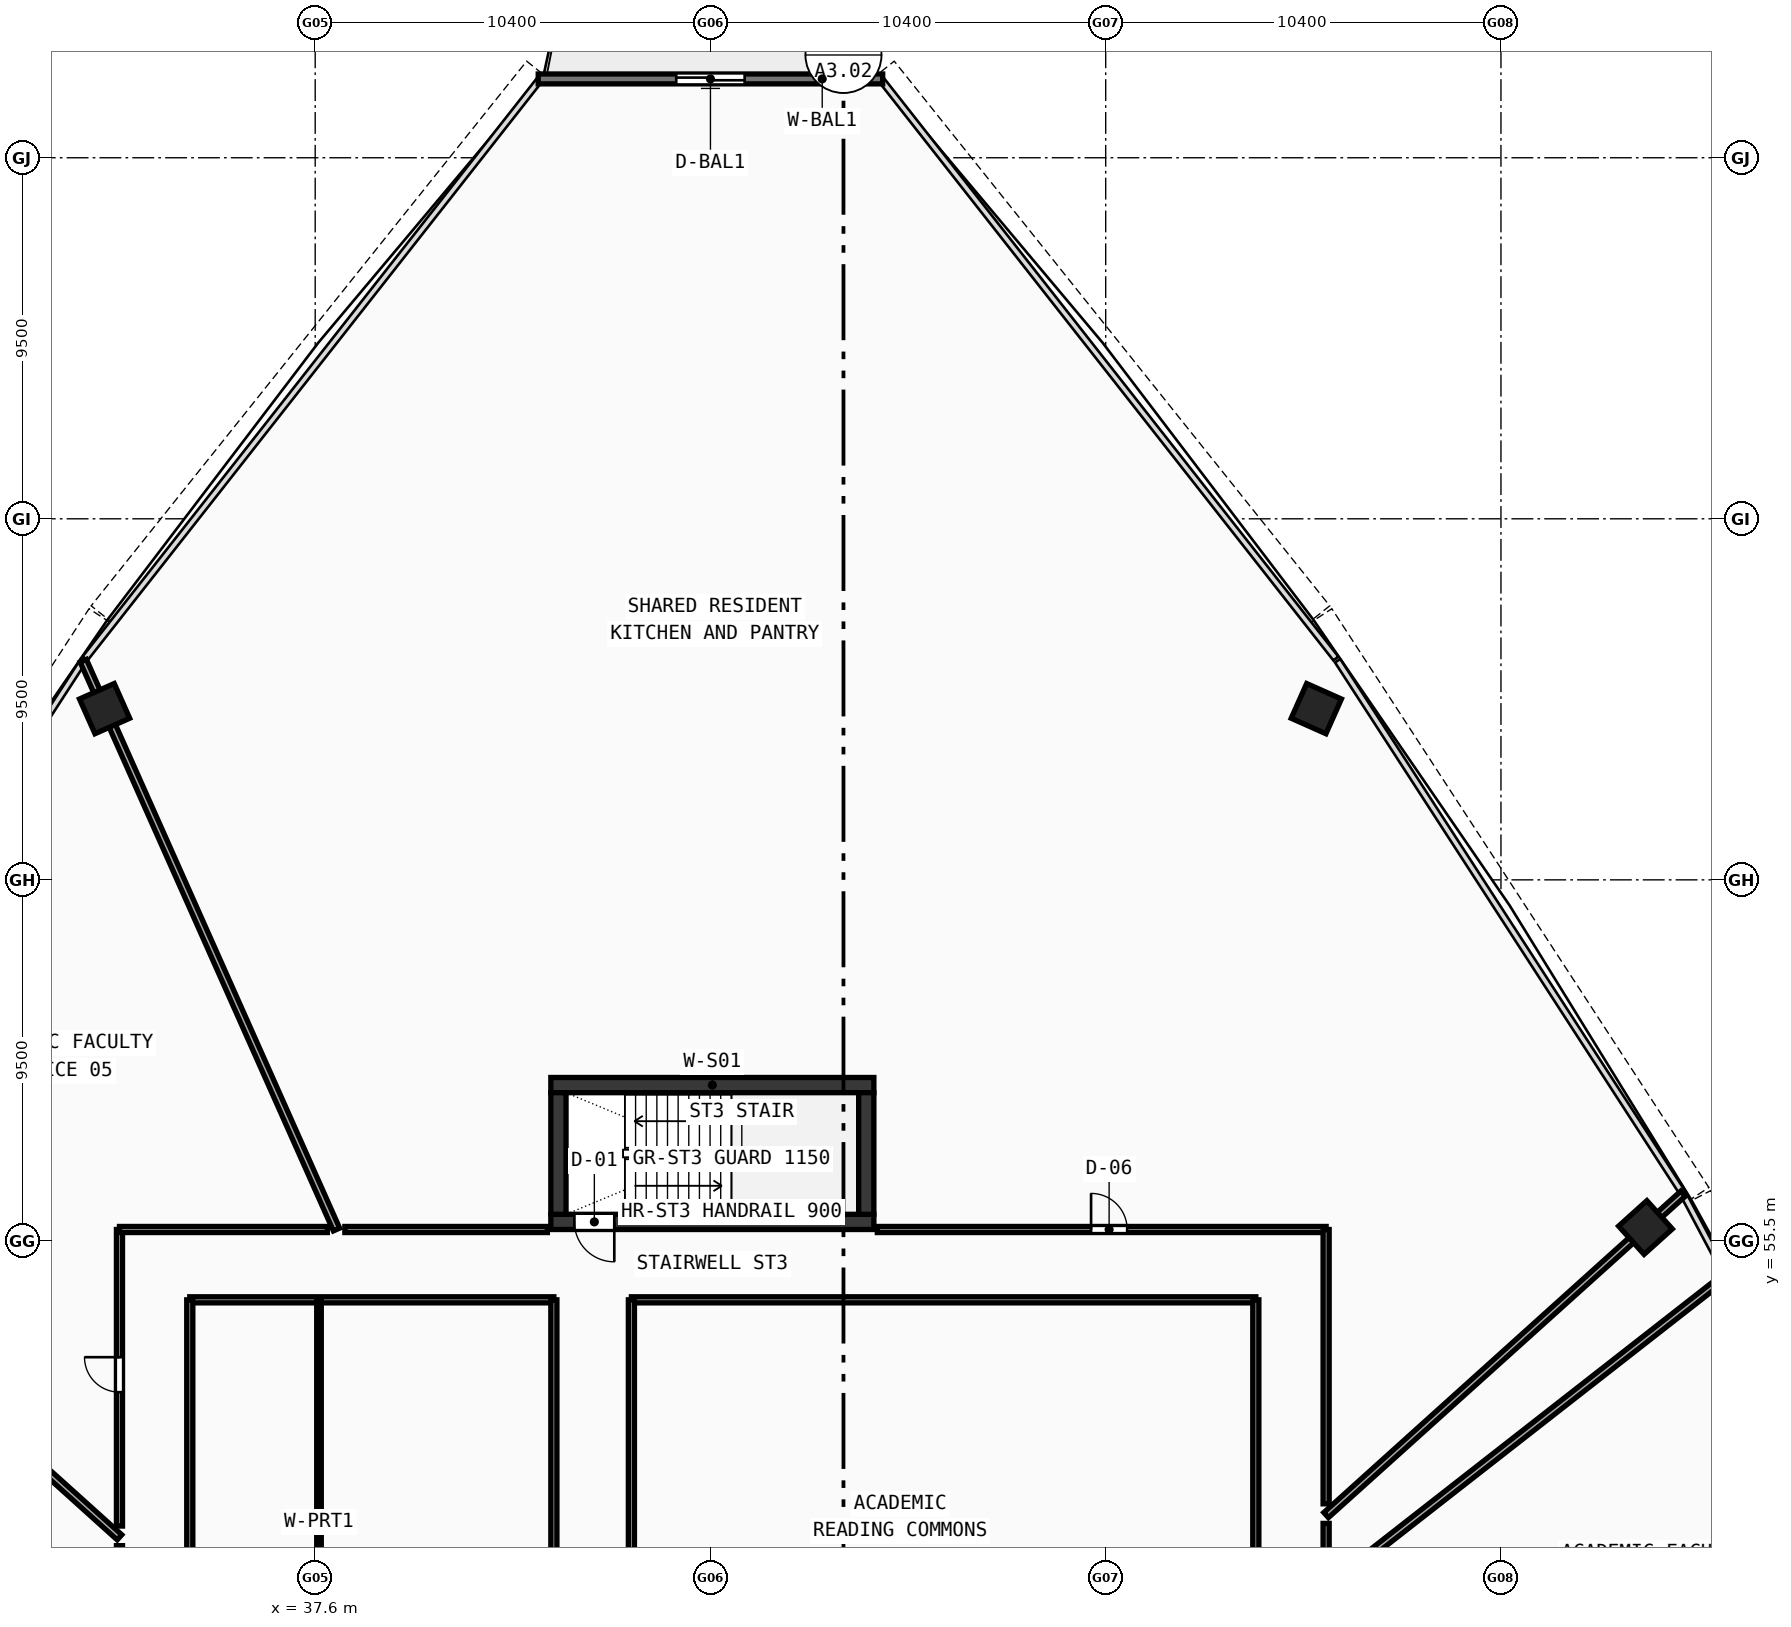
"""IFC4 building model, lengths in metres.
Left out: names, types, materials, properties, quantities, classifications, styles, units other than length and angle.
Written with IfcOpenShell. Run it as: python <this file> out.ifc"""

import sys

from ifc_helpers import new_model, si_unit, direction, frame, frame_2d, origin, origin_with_axes, origin_2d, place, context, subcontext, project, spatial, rectangle, hollow_rectangle, extrude, source, transform, mapped, element, fill, save


model = new_model("IFC4")
c1 = context("Model", 3, precision=1e-05, world=origin(), true_north=direction((0.0, 1.0)))
c2 = subcontext(c1, "Body", "Model", "MODEL_VIEW")
j1 = project(units=[si_unit("LENGTHUNIT", "METRE"), si_unit("PLANEANGLEUNIT", "RADIAN")], contexts=[c1])
p1 = place(None, origin())
s1 = spatial("IfcSite", under=j1, at=p1, CompositionType="ELEMENT")
p2 = place(p1, origin())
s2 = spatial("IfcBuilding", under=s1, at=p2, CompositionType="ELEMENT")
p3 = place(p2, frame((0.0, 0.0, 111.58)))
s3 = spatial("IfcBuildingStorey", under=s2, at=p3, CompositionType="ELEMENT", Elevation=111.58)
p4 = place(p3, frame((43.8, 59.6, 0.0), z_axis=(0.0, 0.0, 1.0), x_axis=(1.0, 0.0, 0.0)))
e1 = element("IfcWall", 1, at=p4, inside=s3, PredefinedType="SHEAR", context=c2, shape_type="SweptSolid", body=[
    extrude(rectangle(XDim=8.5, YDim=0.4, at=frame_2d((4.25, 0.0))), origin(), (0.0, 0.0, 1.0), 3.54),
])
p5 = place(p3, frame((43.8, 56.0, 0.0), z_axis=(0.0, 0.0, 1.0), x_axis=(1.0, 0.0, 0.0)))
e2 = element("IfcWall", 2, at=p5, inside=s3, PredefinedType="SHEAR", context=c2, shape_type="SweptSolid", body=[
    extrude(rectangle(XDim=8.5, YDim=0.4, at=frame_2d((4.25, 0.0))), origin(), (0.0, 0.0, 1.0), 3.54),
])
p6 = place(p5, frame((0.62, 0.0, 0.0)))
e3 = element("IfcOpeningElement", 3, at=p6, cuts=e2, PredefinedType="OPENING", context=c2, shape_type="SweptSolid", body=[
    extrude(rectangle(XDim=1.05, YDim=2.1, at=frame_2d((0.525, 1.05))), frame((0.0, 0.21, 0.0), z_axis=(0.0, -1.0, 0.0), x_axis=(1.0, 0.0, 0.0)), (0.0, 0.0, 1.0), 0.42),
])
for number, where, z_axis, x_axis in (
    (4, (44.0, 56.2, 0.0), (0.0, 0.0, 1.0), (0.0, 1.0, 0.0)),
    (5, (52.1, 56.2, 0.0), (0.0, 0.0, 1.0), (0.0, 1.0, 0.0)),
):
    element("IfcWall", number, at=place(p3, frame(where, z_axis=z_axis, x_axis=x_axis)), inside=s3, PredefinedType="SHEAR", context=c2, shape_type="SweptSolid", body=[
        extrude(rectangle(XDim=3.2, YDim=0.4, at=frame_2d((1.6, 0.0))), origin(), (0.0, 0.0, 1.0), 3.54),
    ])
m1 = source(origin(), c2, "Body", "SweptSolid", [
    extrude(hollow_rectangle(XDim=1.0, YDim=1.0, WallThickness=0.042, at=origin_2d()), origin(), (0.0, 0.0, 1.0), 3.8),
])
for number, where, z_axis, x_axis in (
    (6, (72.603, 55.852, -0.26), (0.0, 0.0, 1.0), (-0.669, 0.743, 0.0)),
    (7, (63.941, 69.505, -0.26), (0.0, 0.0, 1.0), (-0.914, 0.407, 0.0)),
    (8, (32.059, 69.505, -0.26), (0.0, 0.0, 1.0), (-0.914, -0.407, 0.0)),
):
    element("IfcColumn", number, at=place(p3, frame(where, z_axis=z_axis, x_axis=x_axis)), inside=s3, PredefinedType="COLUMN", context=c2, shape_type="MappedRepresentation", body=[
        mapped(m1, transform((0.0, 0.0, 0.0), scale=1.0)),
    ])
p7 = place(p3, frame((52.532, 86.074, 0.0), z_axis=(0.0, 0.0, 1.0), x_axis=(-1.0, 0.0, 0.0)))
e9 = element("IfcWall", 9, at=p7, inside=s3, PredefinedType="STANDARD", context=c2, shape_type="SweptSolid", body=[
    extrude(rectangle(XDim=9.063, YDim=0.26, at=frame_2d((4.532, 0.0))), origin(), (0.0, 0.0, 1.0), 3.54),
])
p8 = place(p7, frame((3.632, 0.0, 0.0)))
e10 = element("IfcOpeningElement", 10, at=p8, cuts=e9, PredefinedType="OPENING", context=c2, shape_type="SweptSolid", body=[
    extrude(rectangle(XDim=1.8, YDim=2.15, at=frame_2d((0.9, 1.075))), frame((0.0, 0.14, 0.0), z_axis=(0.0, -1.0, 0.0), x_axis=(1.0, 0.0, 0.0)), (0.0, 0.0, 1.0), 0.28),
])
p9 = place(p3, frame((34.3, 53.95, 0.0), z_axis=(0.0, 0.0, 1.0), x_axis=(1.0, 0.0, 0.0)))
e11 = element("IfcWall", 11, at=p9, inside=s3, PredefinedType="PARTITIONING", context=c2, shape_type="SweptSolid", body=[
    extrude(rectangle(XDim=9.58, YDim=0.16, at=frame_2d((4.79, 0.0))), origin(), (0.0, 0.0, 1.0), 2.84),
])
for number, where, z_axis, x_axis in (
    (12, (34.3, 42.25, 0.0), (0.0, 0.0, 1.0), (0.0, 1.0, 0.0)),
    (13, (43.88, 42.25, 0.0), (0.0, 0.0, 1.0), (0.0, 1.0, 0.0)),
):
    element("IfcWall", number, at=place(p3, frame(where, z_axis=z_axis, x_axis=x_axis)), inside=s3, PredefinedType="PARTITIONING", context=c2, shape_type="SweptSolid", body=[
        extrude(rectangle(XDim=11.7, YDim=0.16, at=frame_2d((5.85, 0.0))), origin(), (0.0, 0.0, 1.0), 2.84),
    ])
p10 = place(p3, frame((37.7, 42.25, 0.0), z_axis=(0.0, 0.0, 1.0), x_axis=(0.0, 1.0, 0.0)))
e14 = element("IfcWall", 14, at=p10, inside=s3, PredefinedType="PARTITIONING", context=c2, shape_type="SweptSolid", body=[
    extrude(rectangle(XDim=11.7, YDim=0.12, at=frame_2d((5.85, 0.0))), origin(), (0.0, 0.0, 1.0), 2.84),
])
p11 = place(p3, frame((45.92, 53.95, 0.0), z_axis=(0.0, 0.0, 1.0), x_axis=(1.0, 0.0, 0.0)))
e15 = element("IfcWall", 15, at=p11, inside=s3, PredefinedType="PARTITIONING", context=c2, shape_type="SweptSolid", body=[
    extrude(rectangle(XDim=16.43, YDim=0.16, at=frame_2d((8.215, 0.0))), origin(), (0.0, 0.0, 1.0), 2.84),
])
p12 = place(p3, frame((45.92, 42.25, 0.0), z_axis=(0.0, 0.0, 1.0), x_axis=(0.0, 1.0, 0.0)))
e16 = element("IfcWall", 16, at=p12, inside=s3, PredefinedType="PARTITIONING", context=c2, shape_type="SweptSolid", body=[
    extrude(rectangle(XDim=11.7, YDim=0.16, at=frame_2d((5.85, 0.0))), origin(), (0.0, 0.0, 1.0), 3.14),
])
p13 = place(p3, frame((62.35, 42.25, 0.0), z_axis=(0.0, 0.0, 1.0), x_axis=(0.0, 1.0, 0.0)))
e17 = element("IfcWall", 17, at=p13, inside=s3, PredefinedType="PARTITIONING", context=c2, shape_type="SweptSolid", body=[
    extrude(rectangle(XDim=11.7, YDim=0.16, at=frame_2d((5.85, 0.0))), origin(), (0.0, 0.0, 1.0), 2.84),
])
p14 = place(p3, frame((64.2, 46.357, 0.0), z_axis=(0.0, 0.0, 1.0), x_axis=(0.788007209352, 0.615666011738, 0.0)))
e18 = element("IfcWall", 18, at=p14, inside=s3, PredefinedType="PARTITIONING", context=c2, shape_type="SweptSolid", body=[
    extrude(rectangle(XDim=13.37, YDim=0.18, at=frame_2d((6.685, 0.0))), origin(), (0.0, 0.0, 1.0), 2.84),
])
p15 = place(p3, frame((64.2, 48.287, 0.0), z_axis=(0.0, 0.0, 1.0), x_axis=(0.743140441227, 0.66913547553, 0.0)))
e19 = element("IfcWall", 19, at=p15, inside=s3, PredefinedType="PARTITIONING", context=c2, shape_type="SweptSolid", body=[
    extrude(rectangle(XDim=12.638, YDim=0.18, at=frame_2d((6.319, 0.0))), origin(), (0.0, 0.0, 1.0), 2.84),
])
p16 = place(p3, frame((38.16, 55.8, 0.0), z_axis=(0.0, 0.0, 1.0), x_axis=(-0.406727469891, 0.913549541753, 0.0)))
e20 = element("IfcWall", 20, at=p16, inside=s3, PredefinedType="PARTITIONING", context=c2, shape_type="SweptSolid", body=[
    extrude(rectangle(XDim=16.381, YDim=0.18, at=frame_2d((8.19, 0.0))), origin(), (0.0, 0.0, 1.0), 2.84),
])
p17 = place(p3, frame((32.45, 47.701, 0.0), z_axis=(0.0, 0.0, 1.0), x_axis=(-0.743139607037, 0.669136401979, 0.0)))
e21 = element("IfcWall", 21, at=p17, inside=s3, PredefinedType="PARTITIONING", context=c2, shape_type="SweptSolid", body=[
    extrude(rectangle(XDim=13.513, YDim=0.18, at=frame_2d((6.756, 0.0))), origin(), (0.0, 0.0, 1.0), 2.84),
])
p18 = place(p3, frame((32.45, 40.22, 0.0), z_axis=(0.0, 0.0, 1.0), x_axis=(0.0, 1.0, 0.0)))
e22 = element("IfcWall", 22, at=p18, inside=s3, PredefinedType="PARTITIONING", context=c2, shape_type="SweptSolid", body=[
    extrude(rectangle(XDim=7.262, YDim=0.16, at=frame_2d((3.631, 0.0))), origin(), (0.0, 0.0, 1.0), 2.84),
])
p19 = place(p18, frame((3.162, 0.0, 0.0)))
e23 = element("IfcOpeningElement", 23, at=p19, cuts=e22, PredefinedType="OPENING", context=c2, shape_type="SweptSolid", body=[
    extrude(rectangle(XDim=0.92, YDim=2.1, at=frame_2d((0.46, 1.05))), frame((0.0, 0.09, 0.0), z_axis=(0.0, -1.0, 0.0), x_axis=(1.0, 0.0, 0.0)), (0.0, 0.0, 1.0), 0.18),
])
p20 = place(p3, frame((32.45, 47.997, 0.0), z_axis=(0.0, 0.0, 1.0), x_axis=(0.0, 1.0, 0.0)))
e24 = element("IfcWall", 24, at=p20, inside=s3, PredefinedType="PARTITIONING", context=c2, shape_type="SweptSolid", body=[
    extrude(rectangle(XDim=7.803, YDim=0.16, at=frame_2d((3.901, 0.0))), origin(), (0.0, 0.0, 1.0), 3.14),
])
p21 = place(p20, frame((3.523, 0.0, 0.0)))
e25 = element("IfcOpeningElement", 25, at=p21, cuts=e24, PredefinedType="OPENING", context=c2, shape_type="SweptSolid", body=[
    extrude(rectangle(XDim=0.92, YDim=2.1, at=frame_2d((0.46, 1.05))), frame((0.0, 0.09, 0.0), z_axis=(0.0, -1.0, 0.0), x_axis=(1.0, 0.0, 0.0)), (0.0, 0.0, 1.0), 0.18),
])
p22 = place(p3, frame((32.45, 55.8, 0.0), z_axis=(0.0, 0.0, 1.0), x_axis=(1.0, 0.0, 0.0)))
e26 = element("IfcWall", 26, at=p22, inside=s3, PredefinedType="PARTITIONING", context=c2, shape_type="SweptSolid", body=[
    extrude(rectangle(XDim=5.47, YDim=0.16, at=frame_2d((2.735, 0.0))), origin(), (0.0, 0.0, 1.0), 3.14),
])
p23 = place(p3, frame((38.38, 55.8, 0.0), z_axis=(0.0, 0.0, 1.0), x_axis=(1.0, 0.0, 0.0)))
e27 = element("IfcWall", 27, at=p23, inside=s3, PredefinedType="PARTITIONING", context=c2, shape_type="SweptSolid", body=[
    extrude(rectangle(XDim=5.329, YDim=0.16, at=frame_2d((2.665, 0.0))), origin(), (0.0, 0.0, 1.0), 2.84),
])
p24 = place(p3, frame((52.391, 55.8, 0.0), z_axis=(0.0, 0.0, 1.0), x_axis=(1.0, 0.0, 0.0)))
e28 = element("IfcWall", 28, at=p24, inside=s3, PredefinedType="PARTITIONING", context=c2, shape_type="SweptSolid", body=[
    extrude(rectangle(XDim=11.809, YDim=0.16, at=frame_2d((5.904, 0.0))), origin(), (0.0, 0.0, 1.0), 2.84),
])
p25 = place(p24, frame((5.624, 0.0, 0.0)))
e29 = element("IfcOpeningElement", 29, at=p25, cuts=e28, PredefinedType="OPENING", context=c2, shape_type="SweptSolid", body=[
    extrude(rectangle(XDim=0.95, YDim=2.1, at=frame_2d((0.475, 1.05))), frame((0.0, 0.09, 0.0), z_axis=(0.0, -1.0, 0.0), x_axis=(1.0, 0.0, 0.0)), (0.0, 0.0, 1.0), 0.18),
])
p26 = place(p3, frame((64.2, 55.8, 0.0), z_axis=(0.0, 0.0, 1.0), x_axis=(0.0, -1.0, 0.0)))
e30 = element("IfcWall", 30, at=p26, inside=s3, PredefinedType="PARTITIONING", context=c2, shape_type="SweptSolid", body=[
    extrude(rectangle(XDim=7.218, YDim=0.16, at=frame_2d((3.609, 0.0))), origin(), (0.0, 0.0, 1.0), 3.14),
])
p27 = place(p3, frame((64.2, 48.067, 0.0), z_axis=(0.0, 0.0, 1.0), x_axis=(0.0, -1.0, 0.0)))
e31 = element("IfcWall", 31, at=p27, inside=s3, PredefinedType="PARTITIONING", context=c2, shape_type="SweptSolid", body=[
    extrude(rectangle(XDim=1.431, YDim=0.16, at=frame_2d((0.715, 0.0))), origin(), (0.0, 0.0, 1.0), 2.84),
])
m2 = source(origin(), c2, "Body", "SweptSolid", [
    extrude(rectangle(XDim=1.8, YDim=2.15, at=frame_2d((0.9, 1.075))), frame((0.0, 0.025, 0.0), z_axis=(0.0, -1.0, 0.0), x_axis=(1.0, 0.0, 0.0)), (0.0, 0.0, 1.0), 0.05),
])
p28 = place(p8, origin_with_axes())
e32 = element("IfcDoor", 32, at=p28, inside=s3, OperationType="DOUBLE_DOOR_SLIDING", PredefinedType="DOOR", context=c2, shape_type="MappedRepresentation", body=[
    mapped(m2, transform((0.0, 0.0, 0.0), scale=1.0)),
])
fill(e10, e32)
m3 = source(origin(), c2, "Body", "SweptSolid", [
    extrude(rectangle(XDim=1.05, YDim=2.1, at=frame_2d((0.525, 1.05))), frame((0.0, 0.025, 0.0), z_axis=(0.0, -1.0, 0.0), x_axis=(1.0, 0.0, 0.0)), (0.0, 0.0, 1.0), 0.05),
])
p29 = place(p6, frame((1.05, 0.0, 0.0), z_axis=(0.0, 0.0, 1.0), x_axis=(-1.0, 0.0, 0.0)))
e33 = element("IfcDoor", 33, at=p29, inside=s3, OperationType="SINGLE_SWING_LEFT", PredefinedType="DOOR", context=c2, shape_type="MappedRepresentation", body=[
    mapped(m3, transform((0.0, 0.0, 0.0), scale=1.0)),
])
fill(e3, e33)
m4 = source(origin(), c2, "Body", "SweptSolid", [
    extrude(rectangle(XDim=0.95, YDim=2.1, at=frame_2d((0.475, 1.05))), frame((0.0, 0.025, 0.0), z_axis=(0.0, -1.0, 0.0), x_axis=(1.0, 0.0, 0.0)), (0.0, 0.0, 1.0), 0.05),
])
p30 = place(p25, origin_with_axes())
e34 = element("IfcDoor", 34, at=p30, inside=s3, OperationType="SINGLE_SWING_LEFT", PredefinedType="DOOR", context=c2, shape_type="MappedRepresentation", body=[
    mapped(m4, transform((0.0, 0.0, 0.0), scale=1.0)),
])
fill(e29, e34)
m5 = source(origin(), c2, "Body", "SweptSolid", [
    extrude(rectangle(XDim=0.92, YDim=2.1, at=frame_2d((0.46, 1.05))), frame((0.0, 0.025, 0.0), z_axis=(0.0, -1.0, 0.0), x_axis=(1.0, 0.0, 0.0)), (0.0, 0.0, 1.0), 0.05),
])
p31 = place(p21, origin_with_axes())
e35 = element("IfcDoor", 35, at=p31, inside=s3, OperationType="SINGLE_SWING_RIGHT", PredefinedType="DOOR", context=c2, shape_type="MappedRepresentation", body=[
    mapped(m5, transform((0.0, 0.0, 0.0), scale=1.0)),
])
fill(e25, e35)
save(model, sys.argv[1])
